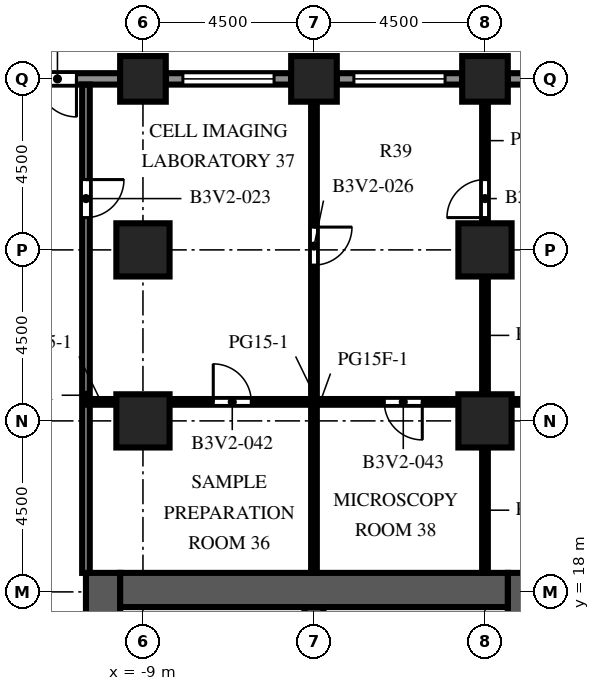
"""IFC4 building model, lengths in metres.
Left out: names, types, materials, properties, quantities, classifications, styles, units other than length and angle.
Written with IfcOpenShell. Run it as: python <this file> out.ifc"""

import sys

from ifc_helpers import new_model, si_unit, direction, frame, frame_2d, origin, origin_2d, place, context, subcontext, project, spatial, rectangle, extrude, element, fill, save


model = new_model("IFC4")
c1 = context("Model", 3, precision=1e-05, world=origin(), true_north=direction((0.0, 1.0)))
c2 = subcontext(c1, "Body", "Model", "MODEL_VIEW")
j1 = project(units=[si_unit("LENGTHUNIT", "METRE"), si_unit("PLANEANGLEUNIT", "RADIAN")], contexts=[c1])
p1 = place(None, origin())
s1 = spatial("IfcSite", under=j1, at=p1, CompositionType="ELEMENT")
p2 = place(p1, origin())
s2 = spatial("IfcBuilding", under=s1, at=p2, CompositionType="ELEMENT")
p3 = place(p2, frame((0.0, 0.0, 102.5)))
s3 = spatial("IfcBuildingStorey", under=s2, at=p3, CompositionType="ELEMENT", Elevation=102.5)
for number, where, z_axis, x_axis in (
    (1, (-9.0, 31.5, 0.0), (0.0, 0.0, 1.0), (1.0, 0.0, 0.0)),
    (2, (-4.5, 31.5, 0.0), (0.0, 0.0, 1.0), (1.0, 0.0, 0.0)),
    (3, (0.0, 31.5, 0.0), (0.0, 0.0, 1.0), (1.0, 0.0, 0.0)),
):
    element("IfcColumn", number, at=place(p3, frame(where, z_axis=z_axis, x_axis=x_axis)), inside=s3, PredefinedType="COLUMN", context=c2, shape_type="SweptSolid", body=[
        extrude(rectangle(XDim=1.2, YDim=1.2, at=origin_2d()), origin(), (0.0, 0.0, 1.0), 4.1),
    ])
for number, where, z_axis, x_axis in (
    (4, (-9.0, 22.5, 0.0), (0.0, 0.0, 1.0), (1.0, 0.0, 0.0)),
    (5, (-9.0, 27.0, 0.0), (0.0, 0.0, 1.0), (1.0, 0.0, 0.0)),
    (6, (0.0, 22.5, 0.0), (0.0, 0.0, 1.0), (1.0, 0.0, 0.0)),
    (7, (0.0, 27.0, 0.0), (0.0, 0.0, 1.0), (1.0, 0.0, 0.0)),
):
    element("IfcColumn", number, at=place(p3, frame(where, z_axis=z_axis, x_axis=x_axis)), inside=s3, PredefinedType="COLUMN", context=c2, shape_type="SweptSolid", body=[
        extrude(rectangle(XDim=1.4, YDim=1.4, at=origin_2d()), origin(), (0.0, 0.0, 1.0), 4.1),
    ])
p4 = place(p3, frame((-10.05, -9.0, 0.0), z_axis=(0.0, 0.0, 1.0), x_axis=(0.0, 1.0, 0.0)))
e8 = element("IfcWall", 8, at=p4, inside=s3, PredefinedType="SHEAR", context=c2, shape_type="SweptSolid", body=[
    extrude(rectangle(XDim=27.5, YDim=0.9, at=frame_2d((13.75, 0.0))), origin(), (0.0, 0.0, 1.0), 4.1),
])
p5 = place(p4, frame((12.55, 0.0, 0.0)))
e9 = element("IfcOpeningElement", 9, at=p5, cuts=e8, PredefinedType="OPENING", context=c2, shape_type="SweptSolid", body=[
    extrude(rectangle(XDim=2.4, YDim=2.4, at=frame_2d((1.2, 1.2))), frame((0.0, 0.46, 0.0), z_axis=(0.0, -1.0, 0.0), x_axis=(1.0, 0.0, 0.0)), (0.0, 0.0, 1.0), 0.92),
])
p6 = place(p4, frame((6.825, 0.0, 0.0)))
e10 = element("IfcOpeningElement", 10, at=p6, cuts=e8, PredefinedType="OPENING", context=c2, shape_type="SweptSolid", body=[
    extrude(rectangle(XDim=1.2, YDim=2.1, at=frame_2d((0.6, 1.05))), frame((0.0, 0.46, 0.0), z_axis=(0.0, -1.0, 0.0), x_axis=(1.0, 0.0, 0.0)), (0.0, 0.0, 1.0), 0.92),
])
p7 = place(p4, frame((19.475, 0.0, 0.0)))
e11 = element("IfcOpeningElement", 11, at=p7, cuts=e8, PredefinedType="OPENING", context=c2, shape_type="SweptSolid", body=[
    extrude(rectangle(XDim=1.2, YDim=2.1, at=frame_2d((0.6, 1.05))), frame((0.0, 0.46, 0.0), z_axis=(0.0, -1.0, 0.0), x_axis=(1.0, 0.0, 0.0)), (0.0, 0.0, 1.0), 0.92),
])
p8 = place(p3, frame((1.05, -9.0, 0.0), z_axis=(0.0, 0.0, 1.0), x_axis=(0.0, 1.0, 0.0)))
e12 = element("IfcWall", 12, at=p8, inside=s3, PredefinedType="SHEAR", context=c2, shape_type="SweptSolid", body=[
    extrude(rectangle(XDim=27.5, YDim=0.9, at=frame_2d((13.75, 0.0))), origin(), (0.0, 0.0, 1.0), 4.1),
])
p9 = place(p8, frame((12.55, 0.0, 0.0)))
e13 = element("IfcOpeningElement", 13, at=p9, cuts=e12, PredefinedType="OPENING", context=c2, shape_type="SweptSolid", body=[
    extrude(rectangle(XDim=2.4, YDim=2.4, at=frame_2d((1.2, 1.2))), frame((0.0, 0.46, 0.0), z_axis=(0.0, -1.0, 0.0), x_axis=(1.0, 0.0, 0.0)), (0.0, 0.0, 1.0), 0.92),
])
p10 = place(p8, frame((3.893, 0.0, 0.0)))
e14 = element("IfcOpeningElement", 14, at=p10, cuts=e12, PredefinedType="OPENING", context=c2, shape_type="SweptSolid", body=[
    extrude(rectangle(XDim=0.923, YDim=2.1, at=frame_2d((0.461, 1.05))), frame((0.0, 0.46, 0.0), z_axis=(0.0, -1.0, 0.0), x_axis=(1.0, 0.0, 0.0)), (0.0, 0.0, 1.0), 0.92),
])
p11 = place(p8, frame((23.427, 0.0, 0.0)))
e15 = element("IfcOpeningElement", 15, at=p11, cuts=e12, PredefinedType="OPENING", context=c2, shape_type="SweptSolid", body=[
    extrude(rectangle(XDim=1.2, YDim=2.1, at=frame_2d((0.6, 1.05))), frame((0.0, 0.46, 0.0), z_axis=(0.0, -1.0, 0.0), x_axis=(1.0, 0.0, 0.0)), (0.0, 0.0, 1.0), 0.92),
])
p12 = place(p3, frame((-9.6, 18.05, 0.0), z_axis=(0.0, 0.0, 1.0), x_axis=(1.0, 0.0, 0.0)))
e16 = element("IfcWall", 16, at=p12, inside=s3, PredefinedType="SHEAR", context=c2, shape_type="SweptSolid", body=[
    extrude(rectangle(XDim=10.2, YDim=0.9, at=frame_2d((5.1, 0.0))), origin(), (0.0, 0.0, 1.0), 4.1),
])
p13 = place(p3, frame((-4.5, 10.25, 0.0), z_axis=(0.0, 0.0, 1.0), x_axis=(0.0, 1.0, 0.0)))
e17 = element("IfcWall", 17, at=p13, inside=s3, PredefinedType="SHEAR", context=c2, shape_type="SweptSolid", body=[
    extrude(rectangle(XDim=7.35, YDim=0.5, at=frame_2d((3.675, 0.0))), origin(), (0.0, 0.0, 1.0), 4.1),
])
p14 = place(p3, frame((0.6, 31.5, 0.0), z_axis=(0.0, 0.0, 1.0), x_axis=(1.0, 0.0, 0.0)))
e18 = element("IfcWall", 18, at=p14, inside=s3, PredefinedType="SOLIDWALL", context=c2, shape_type="SweptSolid", body=[
    extrude(rectangle(XDim=3.3, YDim=0.3, at=frame_2d((1.65, 0.0))), origin(), (0.0, 0.0, 1.0), 2.75),
])
p15 = place(p14, frame((0.45, 0.0, 0.8)))
e19 = element("IfcOpeningElement", 19, at=p15, cuts=e18, PredefinedType="OPENING", context=c2, shape_type="SweptSolid", body=[
    extrude(rectangle(XDim=2.4, YDim=1.7, at=frame_2d((1.2, 0.85))), frame((0.0, 0.16, 0.0), z_axis=(0.0, -1.0, 0.0), x_axis=(1.0, 0.0, 0.0)), (0.0, 0.0, 1.0), 0.32),
])
p16 = place(p3, frame((-3.9, 31.5, 0.0), z_axis=(0.0, 0.0, 1.0), x_axis=(1.0, 0.0, 0.0)))
e20 = element("IfcWall", 20, at=p16, inside=s3, PredefinedType="SOLIDWALL", context=c2, shape_type="SweptSolid", body=[
    extrude(rectangle(XDim=3.3, YDim=0.3, at=frame_2d((1.65, 0.0))), origin(), (0.0, 0.0, 1.0), 2.75),
])
p17 = place(p16, frame((0.45, 0.0, 0.8)))
e21 = element("IfcOpeningElement", 21, at=p17, cuts=e20, PredefinedType="OPENING", context=c2, shape_type="SweptSolid", body=[
    extrude(rectangle(XDim=2.4, YDim=1.7, at=frame_2d((1.2, 0.85))), frame((0.0, 0.16, 0.0), z_axis=(0.0, -1.0, 0.0), x_axis=(1.0, 0.0, 0.0)), (0.0, 0.0, 1.0), 0.32),
])
p18 = place(p3, frame((-8.4, 31.5, 0.0), z_axis=(0.0, 0.0, 1.0), x_axis=(1.0, 0.0, 0.0)))
e22 = element("IfcWall", 22, at=p18, inside=s3, PredefinedType="SOLIDWALL", context=c2, shape_type="SweptSolid", body=[
    extrude(rectangle(XDim=3.3, YDim=0.3, at=frame_2d((1.65, 0.0))), origin(), (0.0, 0.0, 1.0), 2.75),
])
p19 = place(p18, frame((0.45, 0.0, 0.8)))
e23 = element("IfcOpeningElement", 23, at=p19, cuts=e22, PredefinedType="OPENING", context=c2, shape_type="SweptSolid", body=[
    extrude(rectangle(XDim=2.4, YDim=1.7, at=frame_2d((1.2, 0.85))), frame((0.0, 0.16, 0.0), z_axis=(0.0, -1.0, 0.0), x_axis=(1.0, 0.0, 0.0)), (0.0, 0.0, 1.0), 0.32),
])
p20 = place(p3, frame((-12.9, 31.5, 0.0), z_axis=(0.0, 0.0, 1.0), x_axis=(1.0, 0.0, 0.0)))
e24 = element("IfcWall", 24, at=p20, inside=s3, PredefinedType="SOLIDWALL", context=c2, shape_type="SweptSolid", body=[
    extrude(rectangle(XDim=3.3, YDim=0.3, at=frame_2d((1.65, 0.0))), origin(), (0.0, 0.0, 1.0), 2.75),
])
p21 = place(p20, frame((1.15, 0.0, 0.0)))
e25 = element("IfcOpeningElement", 25, at=p21, cuts=e24, PredefinedType="OPENING", context=c2, shape_type="SweptSolid", body=[
    extrude(rectangle(XDim=1.0, YDim=2.2, at=frame_2d((0.5, 1.1))), frame((0.0, 0.16, 0.0), z_axis=(0.0, -1.0, 0.0), x_axis=(1.0, 0.0, 0.0)), (0.0, 0.0, 1.0), 0.32),
])
p22 = place(p3, frame((-0.7, 15.028, 0.0), z_axis=(0.0, 0.0, 1.0), x_axis=(0.0, 1.0, 0.0)))
e26 = element("IfcWall", 26, at=p22, inside=s3, PredefinedType="PARTITIONING", context=c2, shape_type="SweptSolid", body=[
    extrude(rectangle(XDim=2.573, YDim=0.1, at=frame_2d((1.286, 0.0))), origin(), (0.0, 0.0, 1.0), 3.65),
])
p23 = place(p22, frame((0.786, 0.0, 0.0)))
e27 = element("IfcOpeningElement", 27, at=p23, cuts=e26, PredefinedType="OPENING", context=c2, shape_type="SweptSolid", body=[
    extrude(rectangle(XDim=1.0, YDim=2.1, at=frame_2d((0.5, 1.05))), frame((0.0, 0.06, 0.0), z_axis=(0.0, -1.0, 0.0), x_axis=(1.0, 0.0, 0.0)), (0.0, 0.0, 1.0), 0.12),
])
p24 = place(p3, frame((-10.5, 31.35, 0.0), z_axis=(0.0, 0.0, 1.0), x_axis=(0.0, -1.0, 0.0)))
e28 = element("IfcWall", 28, at=p24, inside=s3, PredefinedType="PARTITIONING", context=c2, shape_type="SweptSolid", body=[
    extrude(rectangle(XDim=12.85, YDim=0.2, at=frame_2d((6.425, 0.0))), origin(), (0.0, 0.0, 1.0), 3.65),
])
p25 = place(p24, frame((2.5, 0.0, 0.0)))
e29 = element("IfcOpeningElement", 29, at=p25, cuts=e28, PredefinedType="OPENING", context=c2, shape_type="SweptSolid", body=[
    extrude(rectangle(XDim=1.0, YDim=2.1, at=frame_2d((0.5, 1.05))), frame((0.0, 0.11, 0.0), z_axis=(0.0, -1.0, 0.0), x_axis=(1.0, 0.0, 0.0)), (0.0, 0.0, 1.0), 0.22),
])
p26 = place(p3, frame((-4.5, 30.9, 0.0), z_axis=(0.0, 0.0, 1.0), x_axis=(0.0, -1.0, 0.0)))
e30 = element("IfcWall", 30, at=p26, inside=s3, PredefinedType="PARTITIONING", context=c2, shape_type="SweptSolid", body=[
    extrude(rectangle(XDim=12.4, YDim=0.15, at=frame_2d((6.2, 0.0))), origin(), (0.0, 0.0, 1.0), 3.65),
])
p27 = place(p26, frame((3.3, 0.0, 0.0)))
e31 = element("IfcOpeningElement", 31, at=p27, cuts=e30, PredefinedType="OPENING", context=c2, shape_type="SweptSolid", body=[
    extrude(rectangle(XDim=1.0, YDim=2.1, at=frame_2d((0.5, 1.05))), frame((0.0, 0.085, 0.0), z_axis=(0.0, -1.0, 0.0), x_axis=(1.0, 0.0, 0.0)), (0.0, 0.0, 1.0), 0.17),
])
p28 = place(p3, frame((0.0, 18.5, 0.0), z_axis=(0.0, 0.0, 1.0), x_axis=(0.0, 1.0, 0.0)))
e32 = element("IfcWall", 32, at=p28, inside=s3, PredefinedType="PARTITIONING", context=c2, shape_type="SweptSolid", body=[
    extrude(rectangle(XDim=3.3, YDim=0.15, at=frame_2d((1.65, 0.0))), origin(), (0.0, 0.0, 1.0), 3.65),
])
p29 = place(p3, frame((0.0, 23.2, 0.0), z_axis=(0.0, 0.0, 1.0), x_axis=(0.0, 1.0, 0.0)))
e33 = element("IfcWall", 33, at=p29, inside=s3, PredefinedType="PARTITIONING", context=c2, shape_type="SweptSolid", body=[
    extrude(rectangle(XDim=3.1, YDim=0.15, at=frame_2d((1.55, 0.0))), origin(), (0.0, 0.0, 1.0), 3.65),
])
p30 = place(p3, frame((0.0, 30.9, 0.0), z_axis=(0.0, 0.0, 1.0), x_axis=(0.0, -1.0, 0.0)))
e34 = element("IfcWall", 34, at=p30, inside=s3, PredefinedType="PARTITIONING", context=c2, shape_type="SweptSolid", body=[
    extrude(rectangle(XDim=3.2, YDim=0.15, at=frame_2d((1.6, 0.0))), origin(), (0.0, 0.0, 1.0), 3.65),
])
p31 = place(p30, frame((2.05, 0.0, 0.0)))
e35 = element("IfcOpeningElement", 35, at=p31, cuts=e34, PredefinedType="OPENING", context=c2, shape_type="SweptSolid", body=[
    extrude(rectangle(XDim=1.0, YDim=2.1, at=frame_2d((0.5, 1.05))), frame((0.0, 0.085, 0.0), z_axis=(0.0, -1.0, 0.0), x_axis=(1.0, 0.0, 0.0)), (0.0, 0.0, 1.0), 0.17),
])
p32 = place(p3, frame((-10.5, 23.0, 0.0), z_axis=(0.0, 0.0, 1.0), x_axis=(1.0, 0.0, 0.0)))
e36 = element("IfcWall", 36, at=p32, inside=s3, PredefinedType="PARTITIONING", context=c2, shape_type="SweptSolid", body=[
    extrude(rectangle(XDim=0.8, YDim=0.15, at=frame_2d((0.4, 0.0))), origin(), (0.0, 0.0, 1.0), 3.65),
])
p33 = place(p3, frame((-0.7, 23.0, 0.0), z_axis=(0.0, 0.0, 1.0), x_axis=(-1.0, 0.0, 0.0)))
e37 = element("IfcWall", 37, at=p33, inside=s3, PredefinedType="PARTITIONING", context=c2, shape_type="SweptSolid", body=[
    extrude(rectangle(XDim=7.6, YDim=0.15, at=frame_2d((3.8, 0.0))), origin(), (0.0, 0.0, 1.0), 3.65),
])
p34 = place(p33, frame((5.45, 0.0, 0.0)))
e38 = element("IfcOpeningElement", 38, at=p34, cuts=e37, PredefinedType="OPENING", context=c2, shape_type="SweptSolid", body=[
    extrude(rectangle(XDim=1.0, YDim=2.1, at=frame_2d((0.5, 1.05))), frame((0.0, 0.085, 0.0), z_axis=(0.0, -1.0, 0.0), x_axis=(1.0, 0.0, 0.0)), (0.0, 0.0, 1.0), 0.17),
])
p35 = place(p33, frame((0.95, 0.0, 0.0)))
e39 = element("IfcOpeningElement", 39, at=p35, cuts=e37, PredefinedType="OPENING", context=c2, shape_type="SweptSolid", body=[
    extrude(rectangle(XDim=1.0, YDim=2.1, at=frame_2d((0.5, 1.05))), frame((0.0, 0.085, 0.0), z_axis=(0.0, -1.0, 0.0), x_axis=(1.0, 0.0, 0.0)), (0.0, 0.0, 1.0), 0.17),
])
p36 = place(p3, frame((8.3, 23.0, 0.0), z_axis=(0.0, 0.0, 1.0), x_axis=(-1.0, 0.0, 0.0)))
e40 = element("IfcWall", 40, at=p36, inside=s3, PredefinedType="PARTITIONING", context=c2, shape_type="SweptSolid", body=[
    extrude(rectangle(XDim=7.6, YDim=0.15, at=frame_2d((3.8, 0.0))), origin(), (0.0, 0.0, 1.0), 3.65),
])
p37 = place(p36, frame((3.95, 0.0, 0.0)))
e41 = element("IfcOpeningElement", 41, at=p37, cuts=e40, PredefinedType="OPENING", context=c2, shape_type="SweptSolid", body=[
    extrude(rectangle(XDim=1.0, YDim=2.1, at=frame_2d((0.5, 1.05))), frame((0.0, 0.085, 0.0), z_axis=(0.0, -1.0, 0.0), x_axis=(1.0, 0.0, 0.0)), (0.0, 0.0, 1.0), 0.17),
])
p38 = place(p17, origin())
e42 = element("IfcWindow", 42, at=p38, inside=s3, PartitioningType="SINGLE_PANEL", PredefinedType="WINDOW", context=c2, shape_type="SweptSolid", body=[
    extrude(rectangle(XDim=2.4, YDim=1.7, at=frame_2d((1.2, 0.85))), frame((0.0, 0.03, 0.0), z_axis=(0.0, -1.0, 0.0), x_axis=(1.0, 0.0, 0.0)), (0.0, 0.0, 1.0), 0.06),
])
fill(e21, e42)
p39 = place(p19, origin())
e43 = element("IfcWindow", 43, at=p39, inside=s3, PartitioningType="SINGLE_PANEL", PredefinedType="WINDOW", context=c2, shape_type="SweptSolid", body=[
    extrude(rectangle(XDim=2.4, YDim=1.7, at=frame_2d((1.2, 0.85))), frame((0.0, 0.03, 0.0), z_axis=(0.0, -1.0, 0.0), x_axis=(1.0, 0.0, 0.0)), (0.0, 0.0, 1.0), 0.06),
])
fill(e23, e43)
p40 = place(p21, origin())
e44 = element("IfcDoor", 44, at=p40, inside=s3, OperationType="SINGLE_SWING_RIGHT", PredefinedType="DOOR", context=c2, shape_type="SweptSolid", body=[
    extrude(rectangle(XDim=1.0, YDim=2.2, at=frame_2d((0.5, 1.1))), frame((0.0, 0.025, 0.0), z_axis=(0.0, -1.0, 0.0), x_axis=(1.0, 0.0, 0.0)), (0.0, 0.0, 1.0), 0.05),
])
fill(e25, e44)
p41 = place(p25, origin())
e45 = element("IfcDoor", 45, at=p41, inside=s3, OperationType="SINGLE_SWING_LEFT", PredefinedType="DOOR", context=c2, shape_type="SweptSolid", body=[
    extrude(rectangle(XDim=1.0, YDim=2.1, at=frame_2d((0.5, 1.05))), frame((0.0, 0.025, 0.0), z_axis=(0.0, -1.0, 0.0), x_axis=(1.0, 0.0, 0.0)), (0.0, 0.0, 1.0), 0.05),
])
fill(e29, e45)
p42 = place(p27, origin())
e46 = element("IfcDoor", 46, at=p42, inside=s3, OperationType="SINGLE_SWING_LEFT", PredefinedType="DOOR", context=c2, shape_type="SweptSolid", body=[
    extrude(rectangle(XDim=1.0, YDim=2.1, at=frame_2d((0.5, 1.05))), frame((0.0, 0.025, 0.0), z_axis=(0.0, -1.0, 0.0), x_axis=(1.0, 0.0, 0.0)), (0.0, 0.0, 1.0), 0.05),
])
fill(e31, e46)
p43 = place(p31, origin())
e47 = element("IfcDoor", 47, at=p43, inside=s3, OperationType="SINGLE_SWING_RIGHT", PredefinedType="DOOR", context=c2, shape_type="SweptSolid", body=[
    extrude(rectangle(XDim=1.0, YDim=2.1, at=frame_2d((0.5, 1.05))), frame((0.0, 0.025, 0.0), z_axis=(0.0, -1.0, 0.0), x_axis=(1.0, 0.0, 0.0)), (0.0, 0.0, 1.0), 0.05),
])
fill(e35, e47)
p44 = place(p34, origin())
e48 = element("IfcDoor", 48, at=p44, inside=s3, OperationType="SINGLE_SWING_RIGHT", PredefinedType="DOOR", context=c2, shape_type="SweptSolid", body=[
    extrude(rectangle(XDim=1.0, YDim=2.1, at=frame_2d((0.5, 1.05))), frame((0.0, 0.025, 0.0), z_axis=(0.0, -1.0, 0.0), x_axis=(1.0, 0.0, 0.0)), (0.0, 0.0, 1.0), 0.05),
])
fill(e38, e48)
p45 = place(p35, origin())
e49 = element("IfcDoor", 49, at=p45, inside=s3, OperationType="SINGLE_SWING_LEFT", PredefinedType="DOOR", context=c2, shape_type="SweptSolid", body=[
    extrude(rectangle(XDim=1.0, YDim=2.1, at=frame_2d((0.5, 1.05))), frame((0.0, 0.025, 0.0), z_axis=(0.0, -1.0, 0.0), x_axis=(1.0, 0.0, 0.0)), (0.0, 0.0, 1.0), 0.05),
])
fill(e39, e49)
save(model, sys.argv[1])
